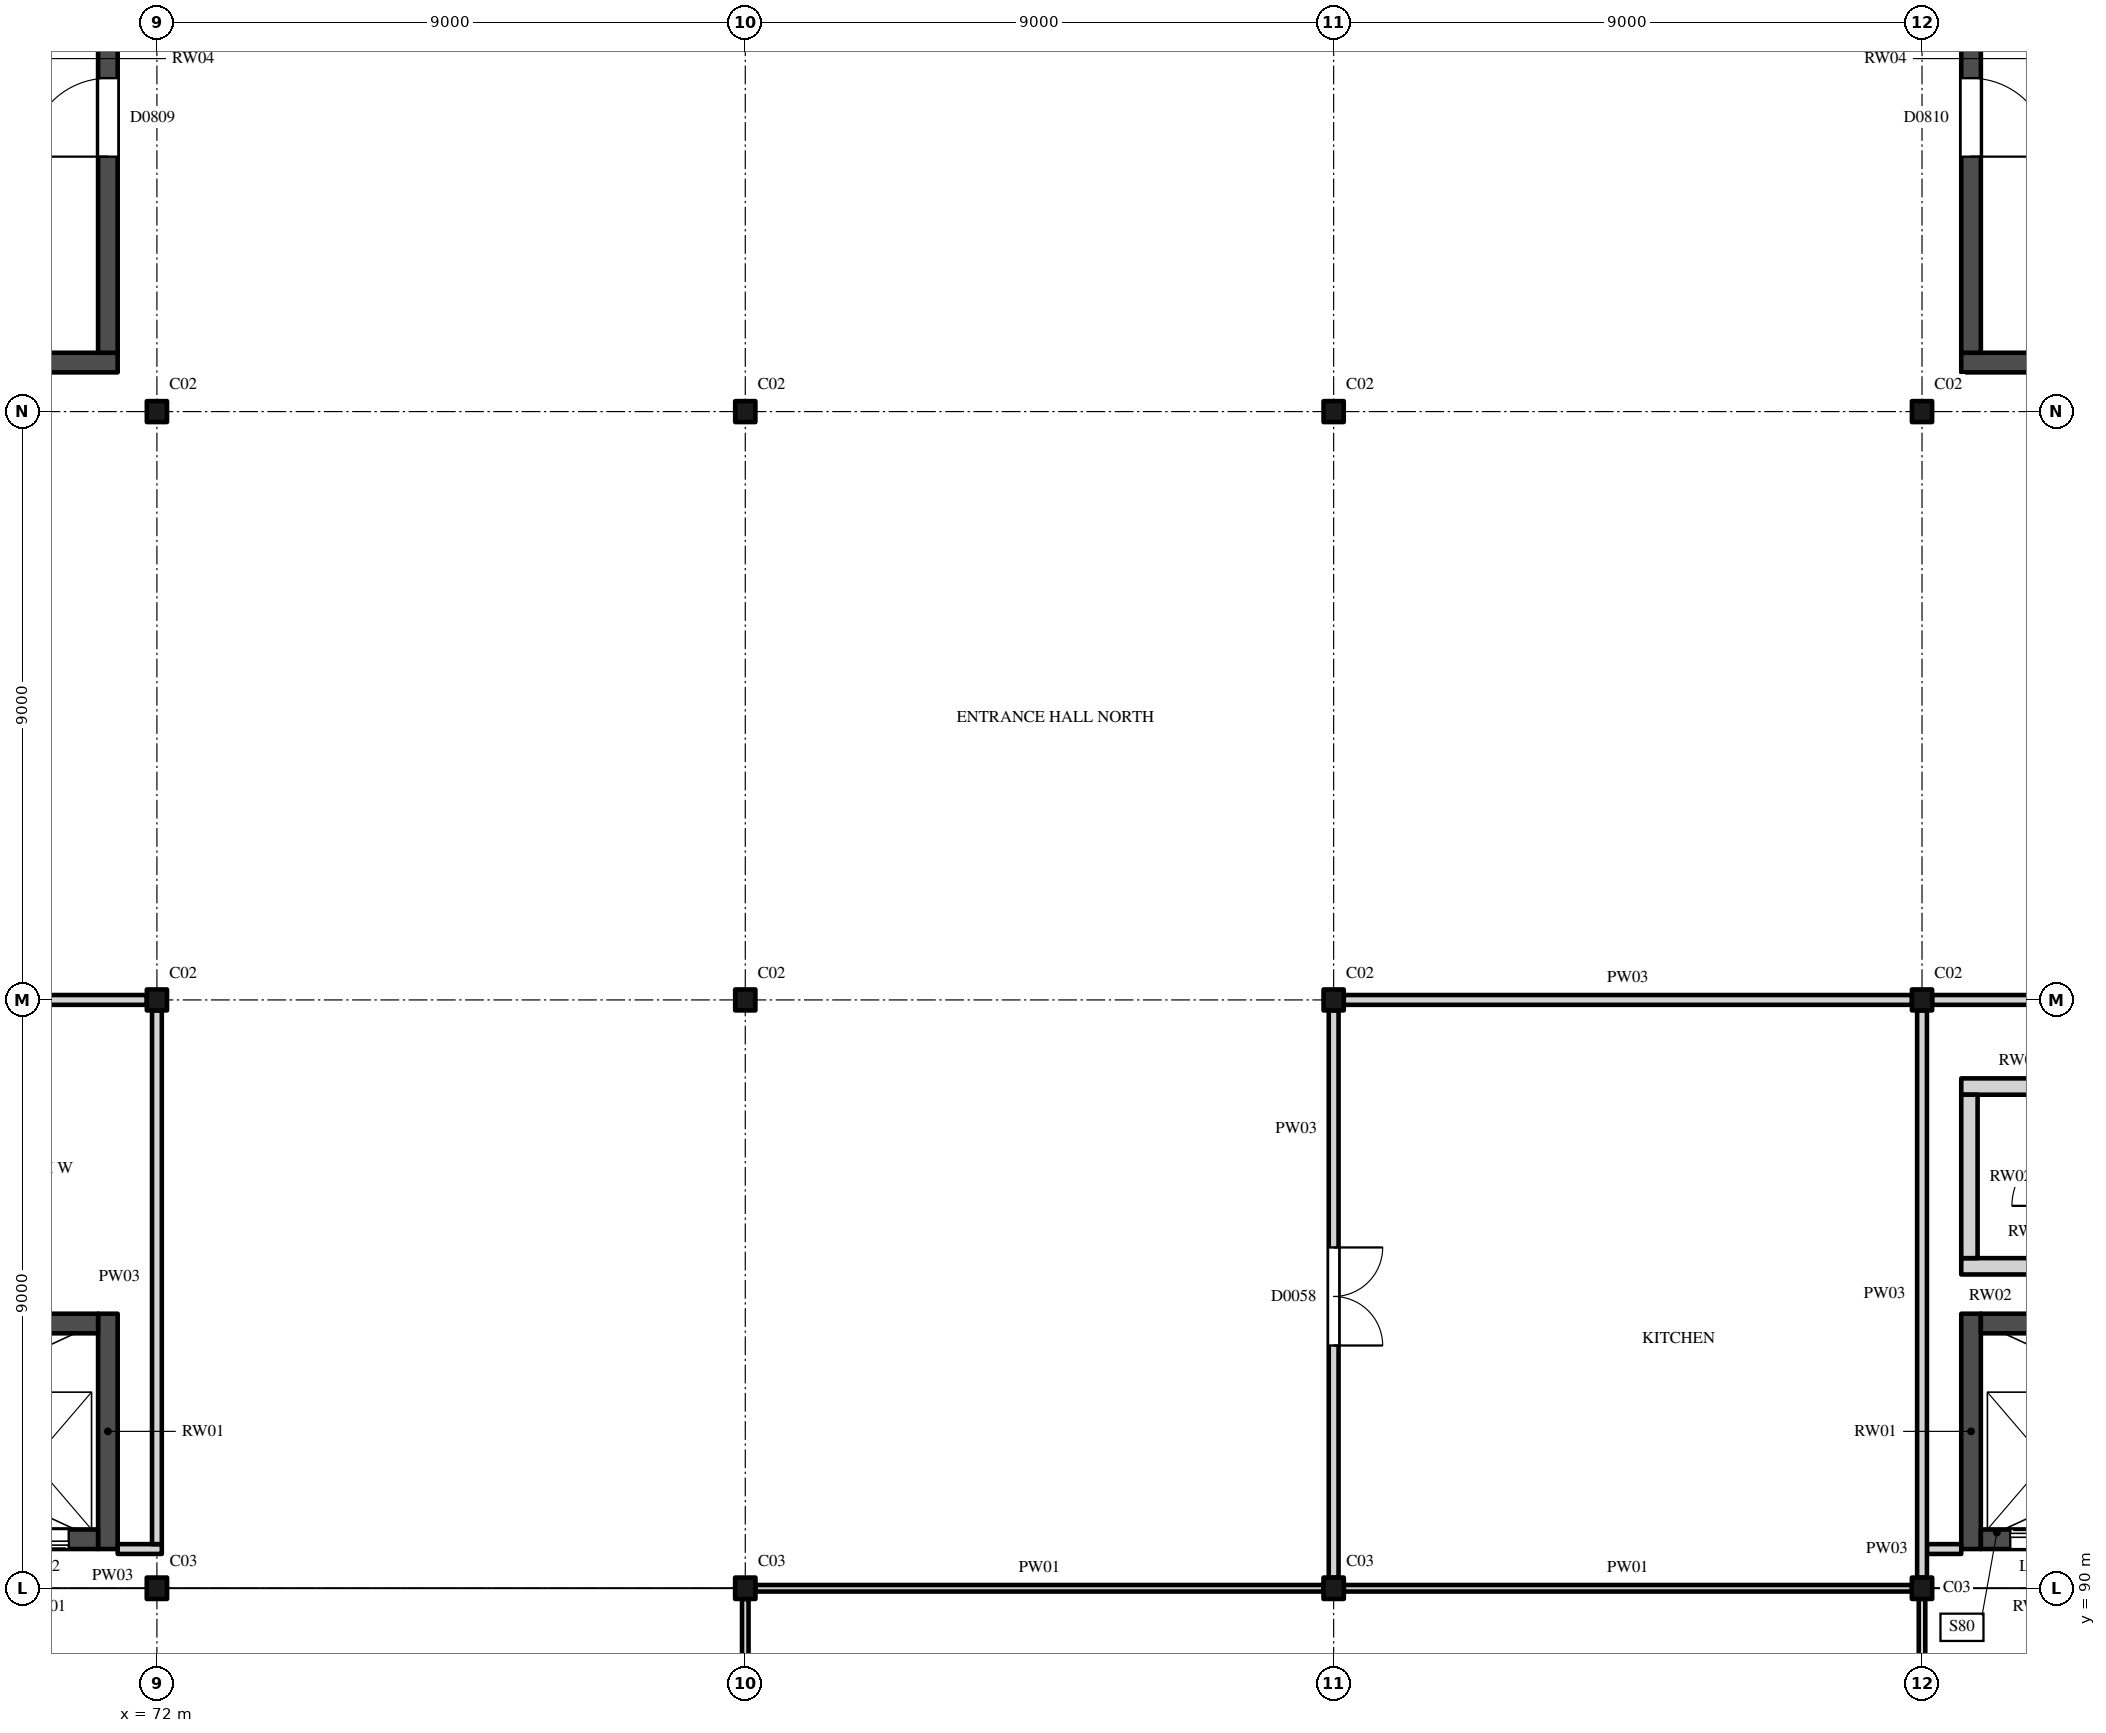
"""IFC4 building model, lengths in metres.
Left out: names, types, materials, properties, quantities, classifications, styles, units other than length and angle.
Written with IfcOpenShell. Run it as: python <this file> out.ifc"""

import sys

from ifc_helpers import new_model, si_unit, direction, frame, frame_2d, origin, origin_2d, place, context, subcontext, project, spatial, rectangle, i_section, extrude, element, fill, save


model = new_model("IFC4")
c1 = context("Model", 3, precision=1e-05, world=origin(), true_north=direction((0.0, 1.0)))
c2 = subcontext(c1, "Body", "Model", "MODEL_VIEW")
j1 = project(units=[si_unit("LENGTHUNIT", "METRE"), si_unit("PLANEANGLEUNIT", "RADIAN")], contexts=[c1])
p1 = place(None, origin())
s1 = spatial("IfcSite", under=j1, at=p1, CompositionType="ELEMENT")
p2 = place(p1, origin())
s2 = spatial("IfcBuilding", under=s1, at=p2, CompositionType="ELEMENT")
p3 = place(p2, origin())
s3 = spatial("IfcBuildingStorey", under=s2, at=p3, CompositionType="ELEMENT", Elevation=0.0)
for number, where, z_axis, x_axis in (
    (1, (72.0, 90.0, 0.0), (0.0, 0.0, 1.0), (1.0, 0.0, 0.0)),
    (2, (81.0, 90.0, 0.0), (0.0, 0.0, 1.0), (1.0, 0.0, 0.0)),
    (3, (90.0, 90.0, 0.0), (0.0, 0.0, 1.0), (1.0, 0.0, 0.0)),
    (4, (99.0, 90.0, 0.0), (0.0, 0.0, 1.0), (1.0, 0.0, 0.0)),
):
    element("IfcColumn", number, at=place(p3, frame(where, z_axis=z_axis, x_axis=x_axis)), inside=s3, PredefinedType="COLUMN", context=c2, shape_type="SweptSolid", body=[
        extrude(i_section(OverallWidth=0.311, OverallDepth=0.327, WebThickness=0.016, FlangeThickness=0.025, FilletRadius=0.017, at=origin_2d()), origin(), (0.0, 0.0, 1.0), 6.0),
    ])
for number, where, z_axis, x_axis in (
    (5, (72.0, 99.0, 0.0), (0.0, 0.0, 1.0), (1.0, 0.0, 0.0)),
    (6, (81.0, 99.0, 0.0), (0.0, 0.0, 1.0), (1.0, 0.0, 0.0)),
    (7, (90.0, 99.0, 0.0), (0.0, 0.0, 1.0), (1.0, 0.0, 0.0)),
    (8, (99.0, 99.0, 0.0), (0.0, 0.0, 1.0), (1.0, 0.0, 0.0)),
    (9, (72.0, 108.0, 0.0), (0.0, 0.0, 1.0), (1.0, 0.0, 0.0)),
    (10, (81.0, 108.0, 0.0), (0.0, 0.0, 1.0), (1.0, 0.0, 0.0)),
    (11, (90.0, 108.0, 0.0), (0.0, 0.0, 1.0), (1.0, 0.0, 0.0)),
    (12, (99.0, 108.0, 0.0), (0.0, 0.0, 1.0), (1.0, 0.0, 0.0)),
):
    element("IfcColumn", number, at=place(p3, frame(where, z_axis=z_axis, x_axis=x_axis)), inside=s3, PredefinedType="COLUMN", context=c2, shape_type="SweptSolid", body=[
        extrude(i_section(OverallWidth=0.309, OverallDepth=0.321, WebThickness=0.014, FlangeThickness=0.022, FilletRadius=0.017, at=origin_2d()), origin(), (0.0, 0.0, 1.0), 6.0),
    ])
p4 = place(p3, frame((63.6, 108.75, 0.0), z_axis=(0.0, 0.0, 1.0), x_axis=(1.0, 0.0, 0.0)))
e13 = element("IfcWall", 13, at=p4, inside=s3, PredefinedType="SHEAR", context=c2, shape_type="SweptSolid", body=[
    extrude(rectangle(XDim=7.8, YDim=0.3, at=frame_2d((3.9, 0.0))), origin(), (0.0, 0.0, 1.0), 6.0),
])
p5 = place(p3, frame((71.25, 108.9, 0.0), z_axis=(0.0, 0.0, 1.0), x_axis=(0.0, 1.0, 0.0)))
e14 = element("IfcWall", 14, at=p5, inside=s3, PredefinedType="SHEAR", context=c2, shape_type="SweptSolid", body=[
    extrude(rectangle(XDim=7.8, YDim=0.3, at=frame_2d((3.9, 0.0))), origin(), (0.0, 0.0, 1.0), 6.0),
])
p6 = place(p5, frame((3.0, 0.0, 0.0)))
e15 = element("IfcOpeningElement", 15, at=p6, cuts=e14, PredefinedType="OPENING", context=c2, shape_type="SweptSolid", body=[
    extrude(rectangle(XDim=1.2, YDim=2.1, at=frame_2d((0.6, 1.05))), frame((0.0, 0.16, 0.0), z_axis=(0.0, -1.0, 0.0), x_axis=(1.0, 0.0, 0.0)), (0.0, 0.0, 1.0), 0.32),
])
p7 = place(p3, frame((99.6, 108.75, 0.0), z_axis=(0.0, 0.0, 1.0), x_axis=(1.0, 0.0, 0.0)))
e16 = element("IfcWall", 16, at=p7, inside=s3, PredefinedType="SHEAR", context=c2, shape_type="SweptSolid", body=[
    extrude(rectangle(XDim=7.8, YDim=0.3, at=frame_2d((3.9, 0.0))), origin(), (0.0, 0.0, 1.0), 6.0),
])
p8 = place(p3, frame((99.75, 108.9, 0.0), z_axis=(0.0, 0.0, 1.0), x_axis=(0.0, 1.0, 0.0)))
e17 = element("IfcWall", 17, at=p8, inside=s3, PredefinedType="SHEAR", context=c2, shape_type="SweptSolid", body=[
    extrude(rectangle(XDim=7.8, YDim=0.3, at=frame_2d((3.9, 0.0))), origin(), (0.0, 0.0, 1.0), 6.0),
])
p9 = place(p8, frame((3.0, 0.0, 0.0)))
e18 = element("IfcOpeningElement", 18, at=p9, cuts=e17, PredefinedType="OPENING", context=c2, shape_type="SweptSolid", body=[
    extrude(rectangle(XDim=1.2, YDim=2.1, at=frame_2d((0.6, 1.05))), frame((0.0, 0.16, 0.0), z_axis=(0.0, -1.0, 0.0), x_axis=(1.0, 0.0, 0.0)), (0.0, 0.0, 1.0), 0.32),
])
p10 = place(p3, frame((71.25, 90.6, -1.5), z_axis=(0.0, 0.0, 1.0), x_axis=(0.0, 1.0, 0.0)))
e19 = element("IfcWall", 19, at=p10, inside=s3, PredefinedType="SHEAR", context=c2, shape_type="SweptSolid", body=[
    extrude(rectangle(XDim=3.6, YDim=0.3, at=frame_2d((1.8, 0.0))), origin(), (0.0, 0.0, 1.0), 7.5),
])
p11 = place(p3, frame((68.95, 90.75, -1.5), z_axis=(0.0, 0.0, 1.0), x_axis=(1.0, 0.0, 0.0)))
e20 = element("IfcWall", 20, at=p11, inside=s3, PredefinedType="SHEAR", context=c2, shape_type="SweptSolid", body=[
    extrude(rectangle(XDim=2.15, YDim=0.3, at=frame_2d((1.075, 0.0))), origin(), (0.0, 0.0, 1.0), 7.5),
])
p12 = place(p11, frame((0.6, 0.0, 1.5)))
e21 = element("IfcOpeningElement", 21, at=p12, cuts=e20, PredefinedType="OPENING", context=c2, shape_type="SweptSolid", body=[
    extrude(rectangle(XDim=1.1, YDim=2.1, at=frame_2d((0.55, 1.05))), frame((0.0, 0.16, 0.0), z_axis=(0.0, -1.0, 0.0), x_axis=(1.0, 0.0, 0.0)), (0.0, 0.0, 1.0), 0.32),
])
p13 = place(p3, frame((68.95, 94.05, -1.5), z_axis=(0.0, 0.0, 1.0), x_axis=(1.0, 0.0, 0.0)))
e22 = element("IfcWall", 22, at=p13, inside=s3, PredefinedType="SHEAR", context=c2, shape_type="SweptSolid", body=[
    extrude(rectangle(XDim=2.15, YDim=0.3, at=frame_2d((1.075, 0.0))), origin(), (0.0, 0.0, 1.0), 7.5),
])
p14 = place(p3, frame((99.75, 90.6, -1.5), z_axis=(0.0, 0.0, 1.0), x_axis=(0.0, 1.0, 0.0)))
e23 = element("IfcWall", 23, at=p14, inside=s3, PredefinedType="SHEAR", context=c2, shape_type="SweptSolid", body=[
    extrude(rectangle(XDim=3.6, YDim=0.3, at=frame_2d((1.8, 0.0))), origin(), (0.0, 0.0, 1.0), 7.5),
])
p15 = place(p3, frame((99.9, 90.75, -1.5), z_axis=(0.0, 0.0, 1.0), x_axis=(1.0, 0.0, 0.0)))
e24 = element("IfcWall", 24, at=p15, inside=s3, PredefinedType="SHEAR", context=c2, shape_type="SweptSolid", body=[
    extrude(rectangle(XDim=2.15, YDim=0.3, at=frame_2d((1.075, 0.0))), origin(), (0.0, 0.0, 1.0), 7.5),
])
p16 = place(p15, frame((0.45, 0.0, 1.5)))
e25 = element("IfcOpeningElement", 25, at=p16, cuts=e24, PredefinedType="OPENING", context=c2, shape_type="SweptSolid", body=[
    extrude(rectangle(XDim=1.1, YDim=2.1, at=frame_2d((0.55, 1.05))), frame((0.0, 0.16, 0.0), z_axis=(0.0, -1.0, 0.0), x_axis=(1.0, 0.0, 0.0)), (0.0, 0.0, 1.0), 0.32),
])
p17 = place(p3, frame((99.9, 94.05, -1.5), z_axis=(0.0, 0.0, 1.0), x_axis=(1.0, 0.0, 0.0)))
e26 = element("IfcWall", 26, at=p17, inside=s3, PredefinedType="SHEAR", context=c2, shape_type="SweptSolid", body=[
    extrude(rectangle(XDim=2.15, YDim=0.3, at=frame_2d((1.075, 0.0))), origin(), (0.0, 0.0, 1.0), 7.5),
])
for number, where, z_axis, x_axis in (
    (27, (99.6, 94.925, 0.0), (0.0, 0.0, 1.0), (1.0, 0.0, 0.0)),
    (28, (99.6, 97.675, 0.0), (0.0, 0.0, 1.0), (1.0, 0.0, 0.0)),
):
    element("IfcWall", number, at=place(p3, frame(where, z_axis=z_axis, x_axis=x_axis)), inside=s3, PredefinedType="STANDARD", context=c2, shape_type="SweptSolid", body=[
        extrude(rectangle(XDim=1.8, YDim=0.25, at=frame_2d((0.9, 0.0))), origin(), (0.0, 0.0, 1.0), 6.0),
    ])
p18 = place(p3, frame((99.725, 95.05, 0.0), z_axis=(0.0, 0.0, 1.0), x_axis=(0.0, 1.0, 0.0)))
e29 = element("IfcWall", 29, at=p18, inside=s3, PredefinedType="STANDARD", context=c2, shape_type="SweptSolid", body=[
    extrude(rectangle(XDim=2.5, YDim=0.25, at=frame_2d((1.25, 0.0))), origin(), (0.0, 0.0, 1.0), 6.0),
])
for number, where, z_axis, x_axis in (
    (30, (81.156, 90.0, 0.0), (0.0, 0.0, 1.0), (1.0, 0.0, 0.0)),
    (31, (90.156, 90.0, 0.0), (0.0, 0.0, 1.0), (1.0, 0.0, 0.0)),
):
    element("IfcWall", number, at=place(p3, frame(where, z_axis=z_axis, x_axis=x_axis)), inside=s3, PredefinedType="PARTITIONING", context=c2, shape_type="SweptSolid", body=[
        extrude(rectangle(XDim=8.689, YDim=0.1, at=frame_2d((4.344, 0.0))), origin(), (0.0, 0.0, 1.0), 5.466),
    ])
p19 = place(p3, frame((71.4, 90.6, 0.0), z_axis=(0.0, 0.0, 1.0), x_axis=(1.0, 0.0, 0.0)))
e32 = element("IfcWall", 32, at=p19, inside=s3, PredefinedType="PARTITIONING", context=c2, shape_type="SweptSolid", body=[
    extrude(rectangle(XDim=0.675, YDim=0.15, at=frame_2d((0.337, 0.0))), origin(), (0.0, 0.0, 1.0), 5.825),
])
p20 = place(p3, frame((99.075, 90.6, 0.0), z_axis=(0.0, 0.0, 1.0), x_axis=(1.0, 0.0, 0.0)))
e33 = element("IfcWall", 33, at=p20, inside=s3, PredefinedType="PARTITIONING", context=c2, shape_type="SweptSolid", body=[
    extrude(rectangle(XDim=0.525, YDim=0.15, at=frame_2d((0.263, 0.0))), origin(), (0.0, 0.0, 1.0), 5.825),
])
p21 = place(p3, frame((63.155, 99.0, 0.0), z_axis=(0.0, 0.0, 1.0), x_axis=(1.0, 0.0, 0.0)))
e34 = element("IfcWall", 34, at=p21, inside=s3, PredefinedType="PARTITIONING", context=c2, shape_type="SweptSolid", body=[
    extrude(rectangle(XDim=8.691, YDim=0.15, at=frame_2d((4.345, 0.0))), origin(), (0.0, 0.0, 1.0), 5.466),
])
p22 = place(p21, frame((3.85, 0.0, 0.0)))
e35 = element("IfcOpeningElement", 35, at=p22, cuts=e34, PredefinedType="OPENING", context=c2, shape_type="SweptSolid", body=[
    extrude(rectangle(XDim=1.0, YDim=2.4, at=frame_2d((0.5, 1.2))), frame((0.0, 0.085, 0.0), z_axis=(0.0, -1.0, 0.0), x_axis=(1.0, 0.0, 0.0)), (0.0, 0.0, 1.0), 0.17),
])
p23 = place(p3, frame((90.155, 99.0, 0.0), z_axis=(0.0, 0.0, 1.0), x_axis=(1.0, 0.0, 0.0)))
e36 = element("IfcWall", 36, at=p23, inside=s3, PredefinedType="PARTITIONING", context=c2, shape_type="SweptSolid", body=[
    extrude(rectangle(XDim=8.691, YDim=0.15, at=frame_2d((4.345, 0.0))), origin(), (0.0, 0.0, 1.0), 5.466),
])
p24 = place(p3, frame((99.155, 99.0, 0.0), z_axis=(0.0, 0.0, 1.0), x_axis=(1.0, 0.0, 0.0)))
e37 = element("IfcWall", 37, at=p24, inside=s3, PredefinedType="PARTITIONING", context=c2, shape_type="SweptSolid", body=[
    extrude(rectangle(XDim=8.691, YDim=0.15, at=frame_2d((4.345, 0.0))), origin(), (0.0, 0.0, 1.0), 5.466),
])
p25 = place(p24, frame((3.85, 0.0, 0.0)))
e38 = element("IfcOpeningElement", 38, at=p25, cuts=e37, PredefinedType="OPENING", context=c2, shape_type="SweptSolid", body=[
    extrude(rectangle(XDim=1.0, YDim=2.4, at=frame_2d((0.5, 1.2))), frame((0.0, 0.085, 0.0), z_axis=(0.0, -1.0, 0.0), x_axis=(1.0, 0.0, 0.0)), (0.0, 0.0, 1.0), 0.17),
])
p26 = place(p3, frame((72.0, 90.675, 0.0), z_axis=(0.0, 0.0, 1.0), x_axis=(0.0, 1.0, 0.0)))
e39 = element("IfcWall", 39, at=p26, inside=s3, PredefinedType="PARTITIONING", context=c2, shape_type="SweptSolid", body=[
    extrude(rectangle(XDim=8.165, YDim=0.15, at=frame_2d((4.082, 0.0))), origin(), (0.0, 0.0, 1.0), 5.365),
])
p27 = place(p3, frame((81.0, 81.164, 0.0), z_axis=(0.0, 0.0, 1.0), x_axis=(0.0, 1.0, 0.0)))
e40 = element("IfcWall", 40, at=p27, inside=s3, PredefinedType="PARTITIONING", context=c2, shape_type="SweptSolid", body=[
    extrude(rectangle(XDim=8.673, YDim=0.1, at=frame_2d((4.336, 0.0))), origin(), (0.0, 0.0, 1.0), 5.365),
])
p28 = place(p3, frame((90.0, 90.164, 0.0), z_axis=(0.0, 0.0, 1.0), x_axis=(0.0, 1.0, 0.0)))
e41 = element("IfcWall", 41, at=p28, inside=s3, PredefinedType="PARTITIONING", context=c2, shape_type="SweptSolid", body=[
    extrude(rectangle(XDim=8.676, YDim=0.15, at=frame_2d((4.338, 0.0))), origin(), (0.0, 0.0, 1.0), 5.365),
])
p29 = place(p28, frame((3.55, 0.0, 0.0)))
e42 = element("IfcOpeningElement", 42, at=p29, cuts=e41, PredefinedType="OPENING", context=c2, shape_type="SweptSolid", body=[
    extrude(rectangle(XDim=1.5, YDim=2.1, at=frame_2d((0.75, 1.05))), frame((0.0, 0.085, 0.0), z_axis=(0.0, -1.0, 0.0), x_axis=(1.0, 0.0, 0.0)), (0.0, 0.0, 1.0), 0.17),
])
p30 = place(p3, frame((99.0, 81.164, 0.0), z_axis=(0.0, 0.0, 1.0), x_axis=(0.0, 1.0, 0.0)))
e43 = element("IfcWall", 43, at=p30, inside=s3, PredefinedType="PARTITIONING", context=c2, shape_type="SweptSolid", body=[
    extrude(rectangle(XDim=8.673, YDim=0.1, at=frame_2d((4.336, 0.0))), origin(), (0.0, 0.0, 1.0), 5.365),
])
p31 = place(p3, frame((99.0, 90.164, 0.0), z_axis=(0.0, 0.0, 1.0), x_axis=(0.0, 1.0, 0.0)))
e44 = element("IfcWall", 44, at=p31, inside=s3, PredefinedType="PARTITIONING", context=c2, shape_type="SweptSolid", body=[
    extrude(rectangle(XDim=8.676, YDim=0.15, at=frame_2d((4.338, 0.0))), origin(), (0.0, 0.0, 1.0), 5.365),
])
p32 = place(p6, origin())
e45 = element("IfcDoor", 45, at=p32, inside=s3, OperationType="SINGLE_SWING_RIGHT", PredefinedType="DOOR", context=c2, shape_type="SweptSolid", body=[
    extrude(rectangle(XDim=1.2, YDim=2.1, at=frame_2d((0.6, 1.05))), frame((0.0, 0.025, 0.0), z_axis=(0.0, -1.0, 0.0), x_axis=(1.0, 0.0, 0.0)), (0.0, 0.0, 1.0), 0.05),
])
fill(e15, e45)
p33 = place(p9, origin())
e46 = element("IfcDoor", 46, at=p33, inside=s3, OperationType="SINGLE_SWING_LEFT", PredefinedType="DOOR", context=c2, shape_type="SweptSolid", body=[
    extrude(rectangle(XDim=1.2, YDim=2.1, at=frame_2d((0.6, 1.05))), frame((0.0, 0.025, 0.0), z_axis=(0.0, -1.0, 0.0), x_axis=(1.0, 0.0, 0.0)), (0.0, 0.0, 1.0), 0.05),
])
fill(e18, e46)
p34 = place(p12, origin())
e47 = element("IfcDoor", 47, at=p34, inside=s3, OperationType="DOUBLE_DOOR_SLIDING", PredefinedType="DOOR", context=c2, shape_type="SweptSolid", body=[
    extrude(rectangle(XDim=1.1, YDim=2.1, at=frame_2d((0.55, 1.05))), frame((0.0, 0.025, 0.0), z_axis=(0.0, -1.0, 0.0), x_axis=(1.0, 0.0, 0.0)), (0.0, 0.0, 1.0), 0.05),
])
fill(e21, e47)
p35 = place(p16, origin())
e48 = element("IfcDoor", 48, at=p35, inside=s3, OperationType="DOUBLE_DOOR_SLIDING", PredefinedType="DOOR", context=c2, shape_type="SweptSolid", body=[
    extrude(rectangle(XDim=1.1, YDim=2.1, at=frame_2d((0.55, 1.05))), frame((0.0, 0.025, 0.0), z_axis=(0.0, -1.0, 0.0), x_axis=(1.0, 0.0, 0.0)), (0.0, 0.0, 1.0), 0.05),
])
fill(e25, e48)
p36 = place(p29, origin())
e49 = element("IfcDoor", 49, at=p36, inside=s3, OperationType="DOUBLE_DOOR_SINGLE_SWING", PredefinedType="DOOR", context=c2, shape_type="SweptSolid", body=[
    extrude(rectangle(XDim=1.5, YDim=2.1, at=frame_2d((0.75, 1.05))), frame((0.0, 0.025, 0.0), z_axis=(0.0, -1.0, 0.0), x_axis=(1.0, 0.0, 0.0)), (0.0, 0.0, 1.0), 0.05),
])
fill(e42, e49)
save(model, sys.argv[1])
